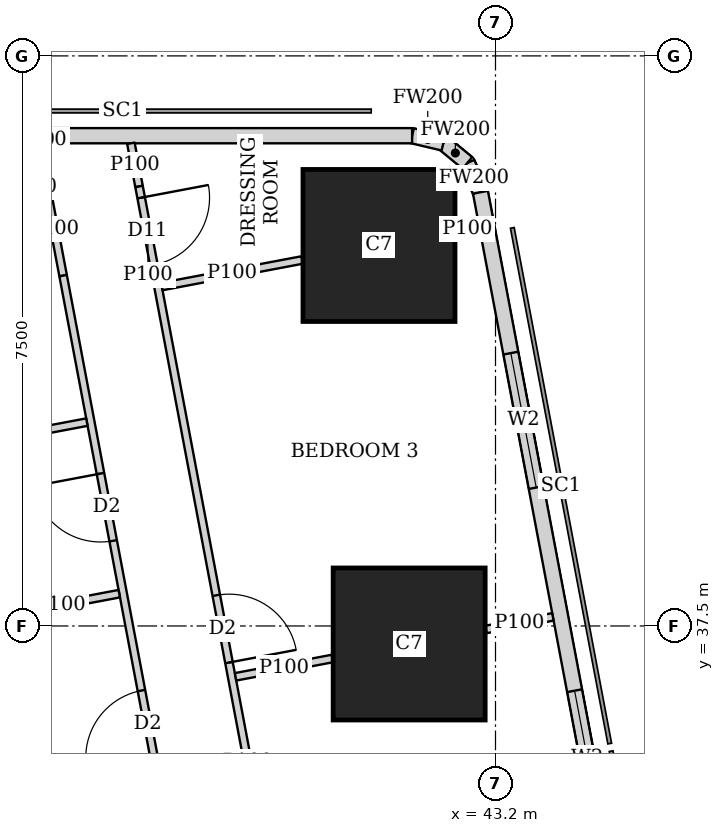
"""IFC4 building model, lengths in metres.
Left out: names, types, materials, properties, quantities, classifications, styles, units other than length and angle.
Written with IfcOpenShell. Run it as: python <this file> out.ifc"""

import sys

from ifc_helpers import new_model, si_unit, direction, frame, frame_2d, origin, origin_2d, place, context, subcontext, project, spatial, rectangle, extrude, element, fill, save


model = new_model("IFC4")
c1 = context("Model", 3, precision=1e-05, world=origin(), true_north=direction((0.0, 1.0)))
c2 = subcontext(c1, "Body", "Model", "MODEL_VIEW")
j1 = project(units=[si_unit("LENGTHUNIT", "METRE"), si_unit("PLANEANGLEUNIT", "RADIAN")], contexts=[c1])
p1 = place(None, origin())
s1 = spatial("IfcSite", under=j1, at=p1, CompositionType="ELEMENT")
p2 = place(p1, origin())
s2 = spatial("IfcBuilding", under=s1, at=p2, CompositionType="ELEMENT")
p3 = place(p2, frame((0.0, 0.0, 262.85)))
s3 = spatial("IfcBuildingStorey", under=s2, at=p3, CompositionType="ELEMENT", Elevation=262.85)
for number, where, z_axis, x_axis in (
    (1, (42.064, 37.263, 0.0), (0.0, 0.0, 1.0), (1.0, 0.0, 0.0)),
    (2, (41.667, 42.506, 0.0), (0.0, 0.0, 1.0), (1.0, 0.0, 0.0)),
):
    element("IfcColumn", number, at=place(p3, frame(where, z_axis=z_axis, x_axis=x_axis)), inside=s3, PredefinedType="COLUMN", context=c2, shape_type="SweptSolid", body=[
        extrude(rectangle(XDim=2.0, YDim=2.0, at=origin_2d()), origin(), (0.0, 0.0, 1.0), 3.75),
    ])
p4 = place(p3, frame((49.684, 7.832, 0.0), z_axis=(0.0, 0.0, 1.0), x_axis=(-0.185616669694, 0.982622232565, 0.0)))
e3 = element("IfcWall", 3, at=p4, inside=s3, PredefinedType="SOLIDWALL", context=c2, shape_type="SweptSolid", body=[
    extrude(rectangle(XDim=36.0, YDim=0.2, at=frame_2d((18.0, 0.0))), origin(), (0.0, 0.0, 1.0), 3.5),
])
p5 = place(p4, frame((2.518, 0.0, 0.9)))
e4 = element("IfcOpeningElement", 4, at=p5, cuts=e3, PredefinedType="OPENING", context=c2, shape_type="SweptSolid", body=[
    extrude(rectangle(XDim=2.4, YDim=1.5, at=frame_2d((1.2, 0.75))), frame((0.0, 0.11, 0.0), z_axis=(0.0, -1.0, 0.0), x_axis=(1.0, 0.0, 0.0)), (0.0, 0.0, 1.0), 0.22),
])
p6 = place(p4, frame((8.444, 0.0, 0.9)))
e5 = element("IfcOpeningElement", 5, at=p6, cuts=e3, PredefinedType="OPENING", context=c2, shape_type="SweptSolid", body=[
    extrude(rectangle(XDim=1.8, YDim=1.5, at=frame_2d((0.9, 0.75))), frame((0.0, 0.11, 0.0), z_axis=(0.0, -1.0, 0.0), x_axis=(1.0, 0.0, 0.0)), (0.0, 0.0, 1.0), 0.22),
])
p7 = place(p4, frame((12.261, 0.0, 0.9)))
e6 = element("IfcOpeningElement", 6, at=p7, cuts=e3, PredefinedType="OPENING", context=c2, shape_type="SweptSolid", body=[
    extrude(rectangle(XDim=1.8, YDim=1.5, at=frame_2d((0.9, 0.75))), frame((0.0, 0.11, 0.0), z_axis=(0.0, -1.0, 0.0), x_axis=(1.0, 0.0, 0.0)), (0.0, 0.0, 1.0), 0.22),
])
p8 = place(p4, frame((16.078, 0.0, 0.9)))
e7 = element("IfcOpeningElement", 7, at=p8, cuts=e3, PredefinedType="OPENING", context=c2, shape_type="SweptSolid", body=[
    extrude(rectangle(XDim=1.8, YDim=1.5, at=frame_2d((0.9, 0.75))), frame((0.0, 0.11, 0.0), z_axis=(0.0, -1.0, 0.0), x_axis=(1.0, 0.0, 0.0)), (0.0, 0.0, 1.0), 0.22),
])
p9 = place(p4, frame((19.894, 0.0, 0.9)))
e8 = element("IfcOpeningElement", 8, at=p9, cuts=e3, PredefinedType="OPENING", context=c2, shape_type="SweptSolid", body=[
    extrude(rectangle(XDim=1.8, YDim=1.5, at=frame_2d((0.9, 0.75))), frame((0.0, 0.11, 0.0), z_axis=(0.0, -1.0, 0.0), x_axis=(1.0, 0.0, 0.0)), (0.0, 0.0, 1.0), 0.22),
])
p10 = place(p4, frame((23.71, 0.0, 0.9)))
e9 = element("IfcOpeningElement", 9, at=p10, cuts=e3, PredefinedType="OPENING", context=c2, shape_type="SweptSolid", body=[
    extrude(rectangle(XDim=1.8, YDim=1.5, at=frame_2d((0.9, 0.75))), frame((0.0, 0.11, 0.0), z_axis=(0.0, -1.0, 0.0), x_axis=(1.0, 0.0, 0.0)), (0.0, 0.0, 1.0), 0.22),
])
p11 = place(p4, frame((27.526, 0.0, 0.9)))
e10 = element("IfcOpeningElement", 10, at=p11, cuts=e3, PredefinedType="OPENING", context=c2, shape_type="SweptSolid", body=[
    extrude(rectangle(XDim=1.8, YDim=1.5, at=frame_2d((0.9, 0.75))), frame((0.0, 0.11, 0.0), z_axis=(0.0, -1.0, 0.0), x_axis=(1.0, 0.0, 0.0)), (0.0, 0.0, 1.0), 0.22),
])
p12 = place(p4, frame((32.046, 0.0, 0.9)))
e11 = element("IfcOpeningElement", 11, at=p12, cuts=e3, PredefinedType="OPENING", context=c2, shape_type="SweptSolid", body=[
    extrude(rectangle(XDim=1.8, YDim=1.5, at=frame_2d((0.9, 0.75))), frame((0.0, 0.11, 0.0), z_axis=(0.0, -1.0, 0.0), x_axis=(1.0, 0.0, 0.0)), (0.0, 0.0, 1.0), 0.22),
])
p13 = place(p3, frame((43.002, 43.206, 0.0), z_axis=(0.0, 0.0, 1.0), x_axis=(-0.40678170573, 0.913525393124, 0.0)))
e12 = element("IfcWall", 12, at=p13, inside=s3, PredefinedType="SOLIDWALL", context=c2, shape_type="SweptSolid", body=[
    extrude(rectangle(XDim=0.423, YDim=0.2, at=frame_2d((0.211, 0.0))), origin(), (0.0, 0.0, 1.0), 3.5),
])
p14 = place(p3, frame((42.83, 43.592, 0.0), z_axis=(0.0, 0.0, 1.0), x_axis=(-0.771190539797, 0.636604391539, 0.0)))
e13 = element("IfcWall", 13, at=p14, inside=s3, PredefinedType="SOLIDWALL", context=c2, shape_type="SweptSolid", body=[
    extrude(rectangle(XDim=0.41, YDim=0.2, at=frame_2d((0.205, 0.0))), origin(), (0.0, 0.0, 1.0), 3.5),
])
p15 = place(p3, frame((42.514, 43.853, 0.0), z_axis=(0.0, 0.0, 1.0), x_axis=(-0.973288080424, 0.229587265555, 0.0)))
e14 = element("IfcWall", 14, at=p15, inside=s3, PredefinedType="SOLIDWALL", context=c2, shape_type="SweptSolid", body=[
    extrude(rectangle(XDim=0.422, YDim=0.2, at=frame_2d((0.211, 0.0))), origin(), (0.0, 0.0, 1.0), 3.5),
])
p16 = place(p3, frame((42.103, 43.95, 0.0), z_axis=(0.0, 0.0, 1.0), x_axis=(-1.0, 0.0, 0.0)))
e15 = element("IfcWall", 15, at=p16, inside=s3, PredefinedType="SOLIDWALL", context=c2, shape_type="SweptSolid", body=[
    extrude(rectangle(XDim=27.54, YDim=0.2, at=frame_2d((13.77, 0.0))), origin(), (0.0, 0.0, 1.0), 3.5),
])
p17 = place(p16, frame((10.603, 0.0, 0.9)))
e16 = element("IfcOpeningElement", 16, at=p17, cuts=e15, PredefinedType="OPENING", context=c2, shape_type="SweptSolid", body=[
    extrude(rectangle(XDim=1.8, YDim=1.5, at=frame_2d((0.9, 0.75))), frame((0.0, 0.11, 0.0), z_axis=(0.0, -1.0, 0.0), x_axis=(1.0, 0.0, 0.0)), (0.0, 0.0, 1.0), 0.22),
])
p18 = place(p16, frame((14.203, 0.0, 0.9)))
e17 = element("IfcOpeningElement", 17, at=p18, cuts=e15, PredefinedType="OPENING", context=c2, shape_type="SweptSolid", body=[
    extrude(rectangle(XDim=1.8, YDim=1.5, at=frame_2d((0.9, 0.75))), frame((0.0, 0.11, 0.0), z_axis=(0.0, -1.0, 0.0), x_axis=(1.0, 0.0, 0.0)), (0.0, 0.0, 1.0), 0.22),
])
p19 = place(p16, frame((17.803, 0.0, 0.9)))
e18 = element("IfcOpeningElement", 18, at=p19, cuts=e15, PredefinedType="OPENING", context=c2, shape_type="SweptSolid", body=[
    extrude(rectangle(XDim=1.8, YDim=1.5, at=frame_2d((0.9, 0.75))), frame((0.0, 0.11, 0.0), z_axis=(0.0, -1.0, 0.0), x_axis=(1.0, 0.0, 0.0)), (0.0, 0.0, 1.0), 0.22),
])
p20 = place(p16, frame((22.822, 0.0, 0.9)))
e19 = element("IfcOpeningElement", 19, at=p20, cuts=e15, PredefinedType="OPENING", context=c2, shape_type="SweptSolid", body=[
    extrude(rectangle(XDim=2.4, YDim=1.5, at=frame_2d((1.2, 0.75))), frame((0.0, 0.11, 0.0), z_axis=(0.0, -1.0, 0.0), x_axis=(1.0, 0.0, 0.0)), (0.0, 0.0, 1.0), 0.22),
])
p21 = place(p3, frame((34.036, 42.186, 0.0), z_axis=(0.0, 0.0, 1.0), x_axis=(0.185593518645, -0.9826266055, 0.0)))
e20 = element("IfcWall", 20, at=p21, inside=s3, PredefinedType="SOLIDWALL", context=c2, shape_type="SweptSolid", body=[
    extrude(rectangle(XDim=35.961, YDim=0.15, at=frame_2d((17.98, 0.0))), origin(), (0.0, 0.0, 1.0), 2.5),
])
p22 = place(p21, frame((15.529, 0.0, 0.0)))
e21 = element("IfcOpeningElement", 21, at=p22, cuts=e20, PredefinedType="OPENING", context=c2, shape_type="SweptSolid", body=[
    extrude(rectangle(XDim=1.0, YDim=2.1, at=frame_2d((0.5, 1.05))), frame((0.0, 0.085, 0.0), z_axis=(0.0, -1.0, 0.0), x_axis=(1.0, 0.0, 0.0)), (0.0, 0.0, 1.0), 0.17),
])
p23 = place(p21, frame((19.345, 0.0, 0.0)))
e22 = element("IfcOpeningElement", 22, at=p23, cuts=e20, PredefinedType="OPENING", context=c2, shape_type="SweptSolid", body=[
    extrude(rectangle(XDim=1.0, YDim=2.1, at=frame_2d((0.5, 1.05))), frame((0.0, 0.085, 0.0), z_axis=(0.0, -1.0, 0.0), x_axis=(1.0, 0.0, 0.0)), (0.0, 0.0, 1.0), 0.17),
])
p24 = place(p21, frame((30.594, 0.0, 0.0)))
e23 = element("IfcOpeningElement", 23, at=p24, cuts=e20, PredefinedType="OPENING", context=c2, shape_type="SweptSolid", body=[
    extrude(rectangle(XDim=1.0, YDim=2.1, at=frame_2d((0.5, 1.05))), frame((0.0, 0.085, 0.0), z_axis=(0.0, -1.0, 0.0), x_axis=(1.0, 0.0, 0.0)), (0.0, 0.0, 1.0), 0.17),
])
p25 = place(p3, frame((38.403, 43.85, 0.0), z_axis=(0.0, 0.0, 1.0), x_axis=(0.184976954078, -0.982742858768, 0.0)))
e24 = element("IfcWall", 24, at=p25, inside=s3, PredefinedType="PARTITIONING", context=c2, shape_type="SweptSolid", body=[
    extrude(rectangle(XDim=0.578, YDim=0.1, at=frame_2d((0.289, 0.0))), origin(), (0.0, 0.0, 1.0), 3.5),
])
p26 = place(p3, frame((38.51, 43.282, 0.0), z_axis=(0.0, 0.0, 1.0), x_axis=(0.185775287495, -0.982592256511, 0.0)))
e25 = element("IfcWall", 25, at=p26, inside=s3, PredefinedType="PARTITIONING", context=c2, shape_type="SweptSolid", body=[
    extrude(rectangle(XDim=1.259, YDim=0.1, at=frame_2d((0.629, 0.0))), origin(), (0.0, 0.0, 1.0), 2.05),
])
p27 = place(p26, frame((0.15, 0.0, 0.0)))
e26 = element("IfcOpeningElement", 26, at=p27, cuts=e25, PredefinedType="OPENING", context=c2, shape_type="SweptSolid", body=[
    extrude(rectangle(XDim=0.9, YDim=2.0, at=frame_2d((0.45, 1.0))), frame((0.0, 0.06, 0.0), z_axis=(0.0, -1.0, 0.0), x_axis=(1.0, 0.0, 0.0)), (0.0, 0.0, 1.0), 0.12),
])
p28 = place(p3, frame((38.744, 42.045, 0.0), z_axis=(0.0, 0.0, 1.0), x_axis=(0.185614085367, -0.982622720739, 0.0)))
e27 = element("IfcWall", 27, at=p28, inside=s3, PredefinedType="PARTITIONING", context=c2, shape_type="SweptSolid", body=[
    extrude(rectangle(XDim=12.898, YDim=0.1, at=frame_2d((6.449, 0.0))), origin(), (0.0, 0.0, 1.0), 2.5),
])
p29 = place(p28, frame((11.848, 0.0, 0.0)))
e28 = element("IfcOpeningElement", 28, at=p29, cuts=e27, PredefinedType="OPENING", context=c2, shape_type="SweptSolid", body=[
    extrude(rectangle(XDim=0.9, YDim=2.1, at=frame_2d((0.45, 1.05))), frame((0.0, 0.06, 0.0), z_axis=(0.0, -1.0, 0.0), x_axis=(1.0, 0.0, 0.0)), (0.0, 0.0, 1.0), 0.12),
])
p30 = place(p28, frame((8.191, 0.0, 0.0)))
e29 = element("IfcOpeningElement", 29, at=p30, cuts=e27, PredefinedType="OPENING", context=c2, shape_type="SweptSolid", body=[
    extrude(rectangle(XDim=0.9, YDim=2.1, at=frame_2d((0.45, 1.05))), frame((0.0, 0.06, 0.0), z_axis=(0.0, -1.0, 0.0), x_axis=(1.0, 0.0, 0.0)), (0.0, 0.0, 1.0), 0.12),
])
p31 = place(p28, frame((4.215, 0.0, 0.0)))
e30 = element("IfcOpeningElement", 30, at=p31, cuts=e27, PredefinedType="OPENING", context=c2, shape_type="SweptSolid", body=[
    extrude(rectangle(XDim=0.9, YDim=2.1, at=frame_2d((0.45, 1.05))), frame((0.0, 0.06, 0.0), z_axis=(0.0, -1.0, 0.0), x_axis=(1.0, 0.0, 0.0)), (0.0, 0.0, 1.0), 0.12),
])
p32 = place(p3, frame((37.277, 43.346, 0.0), z_axis=(0.0, 0.0, 1.0), x_axis=(0.185775287495, -0.982592256511, 0.0)))
e31 = element("IfcWall", 31, at=p32, inside=s3, PredefinedType="PARTITIONING", context=c2, shape_type="SweptSolid", body=[
    extrude(rectangle(XDim=1.259, YDim=0.1, at=frame_2d((0.629, 0.0))), origin(), (0.0, 0.0, 1.0), 2.05),
])
p33 = place(p3, frame((37.511, 42.109, 0.0), z_axis=(0.0, 0.0, 1.0), x_axis=(0.185550464988, -0.982634736279, 0.0)))
e32 = element("IfcWall", 32, at=p33, inside=s3, PredefinedType="PARTITIONING", context=c2, shape_type="SweptSolid", body=[
    extrude(rectangle(XDim=13.35, YDim=0.1, at=frame_2d((6.675, 0.0))), origin(), (0.0, 0.0, 1.0), 2.5),
])
p34 = place(p33, frame((11.845, 0.0, 0.0)))
e33 = element("IfcOpeningElement", 33, at=p34, cuts=e32, PredefinedType="OPENING", context=c2, shape_type="SweptSolid", body=[
    extrude(rectangle(XDim=0.9, YDim=2.1, at=frame_2d((0.45, 1.05))), frame((0.0, 0.06, 0.0), z_axis=(0.0, -1.0, 0.0), x_axis=(1.0, 0.0, 0.0)), (0.0, 0.0, 1.0), 0.12),
])
p35 = place(p33, frame((8.224, 0.0, 0.0)))
e34 = element("IfcOpeningElement", 34, at=p35, cuts=e32, PredefinedType="OPENING", context=c2, shape_type="SweptSolid", body=[
    extrude(rectangle(XDim=0.9, YDim=2.1, at=frame_2d((0.45, 1.05))), frame((0.0, 0.06, 0.0), z_axis=(0.0, -1.0, 0.0), x_axis=(1.0, 0.0, 0.0)), (0.0, 0.0, 1.0), 0.12),
])
p36 = place(p33, frame((2.65, 0.0, 0.0)))
e35 = element("IfcOpeningElement", 35, at=p36, cuts=e32, PredefinedType="OPENING", context=c2, shape_type="SweptSolid", body=[
    extrude(rectangle(XDim=0.9, YDim=2.1, at=frame_2d((0.45, 1.05))), frame((0.0, 0.06, 0.0), z_axis=(0.0, -1.0, 0.0), x_axis=(1.0, 0.0, 0.0)), (0.0, 0.0, 1.0), 0.12),
])
p37 = place(p33, frame((9.936, 0.0, 0.0)))
e36 = element("IfcOpeningElement", 36, at=p37, cuts=e32, PredefinedType="OPENING", context=c2, shape_type="SweptSolid", body=[
    extrude(rectangle(XDim=0.9, YDim=2.1, at=frame_2d((0.45, 1.05))), frame((0.0, 0.06, 0.0), z_axis=(0.0, -1.0, 0.0), x_axis=(1.0, 0.0, 0.0)), (0.0, 0.0, 1.0), 0.12),
])
p38 = place(p33, frame((5.555, 0.0, 0.0)))
e37 = element("IfcOpeningElement", 37, at=p38, cuts=e32, PredefinedType="OPENING", context=c2, shape_type="SweptSolid", body=[
    extrude(rectangle(XDim=0.9, YDim=2.1, at=frame_2d((0.45, 1.05))), frame((0.0, 0.06, 0.0), z_axis=(0.0, -1.0, 0.0), x_axis=(1.0, 0.0, 0.0)), (0.0, 0.0, 1.0), 0.12),
])
p39 = place(p3, frame((42.985, 42.755, 0.0), z_axis=(0.0, 0.0, 1.0), x_axis=(-0.98281924824, -0.184570651215, 0.0)))
e38 = element("IfcWall", 38, at=p39, inside=s3, PredefinedType="PARTITIONING", context=c2, shape_type="SweptSolid", body=[
    extrude(rectangle(XDim=0.313, YDim=0.1, at=frame_2d((0.157, 0.0))), origin(), (0.0, 0.0, 1.0), 3.5),
])
p40 = place(p3, frame((40.657, 42.315, 0.0), z_axis=(0.0, 0.0, 1.0), x_axis=(-0.982622785543, -0.185613742305, 0.0)))
e39 = element("IfcWall", 39, at=p40, inside=s3, PredefinedType="PARTITIONING", context=c2, shape_type="SweptSolid", body=[
    extrude(rectangle(XDim=1.88, YDim=0.1, at=frame_2d((0.94, 0.0))), origin(), (0.0, 0.0, 1.0), 2.05),
])
p41 = place(p3, frame((43.955, 37.62, 0.0), z_axis=(0.0, 0.0, 1.0), x_axis=(-0.982708424405, -0.18515980288, 0.0)))
e40 = element("IfcWall", 40, at=p41, inside=s3, PredefinedType="PARTITIONING", context=c2, shape_type="SweptSolid", body=[
    extrude(rectangle(XDim=0.897, YDim=0.1, at=frame_2d((0.448, 0.0))), origin(), (0.0, 0.0, 1.0), 3.5),
])
p42 = place(p3, frame((41.054, 37.072, 0.0), z_axis=(0.0, 0.0, 1.0), x_axis=(-0.982576752117, -0.185857273733, 0.0)))
e41 = element("IfcWall", 41, at=p42, inside=s3, PredefinedType="PARTITIONING", context=c2, shape_type="SweptSolid", body=[
    extrude(rectangle(XDim=1.297, YDim=0.1, at=frame_2d((0.648, 0.0))), origin(), (0.0, 0.0, 1.0), 3.5),
])
p43 = place(p3, frame((37.824, 40.182, 0.0), z_axis=(0.0, 0.0, 1.0), x_axis=(-0.982674977865, -0.185337227447, 0.0)))
e42 = element("IfcWall", 42, at=p43, inside=s3, PredefinedType="PARTITIONING", context=c2, shape_type="SweptSolid", body=[
    extrude(rectangle(XDim=3.275, YDim=0.1, at=frame_2d((1.637, 0.0))), origin(), (0.0, 0.0, 1.0), 3.5),
])
p44 = place(p3, frame((38.25, 37.925, 0.0), z_axis=(0.0, 0.0, 1.0), x_axis=(-0.982610209589, -0.185680305934, 0.0)))
e43 = element("IfcWall", 43, at=p44, inside=s3, PredefinedType="PARTITIONING", context=c2, shape_type="SweptSolid", body=[
    extrude(rectangle(XDim=1.567, YDim=0.1, at=frame_2d((0.784, 0.0))), origin(), (0.0, 0.0, 1.0), 3.5),
])
p45 = place(p11, origin())
e44 = element("IfcWindow", 44, at=p45, inside=s3, PartitioningType="SINGLE_PANEL", PredefinedType="WINDOW", context=c2, shape_type="SweptSolid", body=[
    extrude(rectangle(XDim=1.8, YDim=1.5, at=frame_2d((0.9, 0.75))), frame((0.0, 0.03, 0.0), z_axis=(0.0, -1.0, 0.0), x_axis=(1.0, 0.0, 0.0)), (0.0, 0.0, 1.0), 0.06),
])
fill(e10, e44)
p46 = place(p12, origin())
e45 = element("IfcWindow", 45, at=p46, inside=s3, PartitioningType="SINGLE_PANEL", PredefinedType="WINDOW", context=c2, shape_type="SweptSolid", body=[
    extrude(rectangle(XDim=1.8, YDim=1.5, at=frame_2d((0.9, 0.75))), frame((0.0, 0.03, 0.0), z_axis=(0.0, -1.0, 0.0), x_axis=(1.0, 0.0, 0.0)), (0.0, 0.0, 1.0), 0.06),
])
fill(e11, e45)
p47 = place(p27, origin())
e46 = element("IfcDoor", 46, at=p47, inside=s3, OperationType="SINGLE_SWING_LEFT", PredefinedType="DOOR", context=c2, shape_type="SweptSolid", body=[
    extrude(rectangle(XDim=0.9, YDim=2.0, at=frame_2d((0.45, 1.0))), frame((0.0, 0.025, 0.0), z_axis=(0.0, -1.0, 0.0), x_axis=(1.0, 0.0, 0.0)), (0.0, 0.0, 1.0), 0.05),
])
fill(e26, e46)
p48 = place(p31, origin())
e47 = element("IfcDoor", 47, at=p48, inside=s3, OperationType="SINGLE_SWING_RIGHT", PredefinedType="DOOR", context=c2, shape_type="SweptSolid", body=[
    extrude(rectangle(XDim=0.9, YDim=2.1, at=frame_2d((0.45, 1.05))), frame((0.0, 0.025, 0.0), z_axis=(0.0, -1.0, 0.0), x_axis=(1.0, 0.0, 0.0)), (0.0, 0.0, 1.0), 0.05),
])
fill(e30, e47)
p49 = place(p36, origin())
e48 = element("IfcDoor", 48, at=p49, inside=s3, OperationType="SINGLE_SWING_RIGHT", PredefinedType="DOOR", context=c2, shape_type="SweptSolid", body=[
    extrude(rectangle(XDim=0.9, YDim=2.1, at=frame_2d((0.45, 1.05))), frame((0.0, 0.025, 0.0), z_axis=(0.0, -1.0, 0.0), x_axis=(1.0, 0.0, 0.0)), (0.0, 0.0, 1.0), 0.05),
])
fill(e35, e48)
p50 = place(p38, origin())
e49 = element("IfcDoor", 49, at=p50, inside=s3, OperationType="SINGLE_SWING_LEFT", PredefinedType="DOOR", context=c2, shape_type="SweptSolid", body=[
    extrude(rectangle(XDim=0.9, YDim=2.1, at=frame_2d((0.45, 1.05))), frame((0.0, 0.025, 0.0), z_axis=(0.0, -1.0, 0.0), x_axis=(1.0, 0.0, 0.0)), (0.0, 0.0, 1.0), 0.05),
])
fill(e37, e49)
save(model, sys.argv[1])
